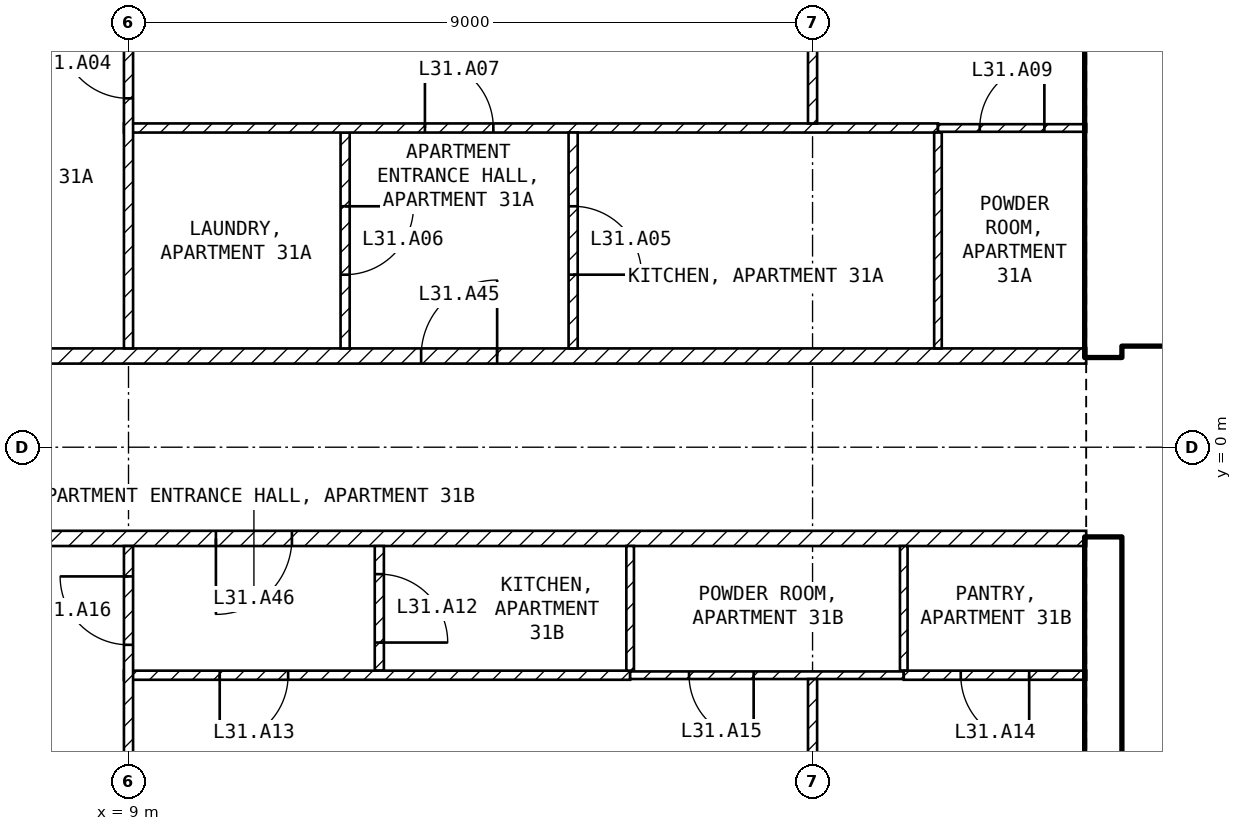
"""IFC4 building model, lengths in metres.
Left out: names, types, materials, properties, quantities, classifications, styles, units other than length and angle.
Written with IfcOpenShell. Run it as: python <this file> out.ifc"""

import sys

from ifc_helpers import new_model, si_unit, direction, frame, frame_2d, origin, place, context, subcontext, project, spatial, rectangle, extrude, element, fill, save


model = new_model("IFC4")
c1 = context("Model", 3, precision=1e-05, world=origin(), true_north=direction((0.0, 1.0)))
c2 = subcontext(c1, "Body", "Model", "MODEL_VIEW")
j1 = project(units=[si_unit("LENGTHUNIT", "METRE"), si_unit("PLANEANGLEUNIT", "RADIAN")], contexts=[c1])
p1 = place(None, origin())
s1 = spatial("IfcSite", under=j1, at=p1, CompositionType="ELEMENT")
p2 = place(p1, origin())
s2 = spatial("IfcBuilding", under=s1, at=p2, CompositionType="ELEMENT")
p3 = place(p2, frame((0.0, 0.0, 130.4)))
s3 = spatial("IfcBuildingStorey", under=s2, at=p3, CompositionType="ELEMENT", Elevation=130.4)
for number, where, z_axis, x_axis in (
    (1, (21.825, -8.1, 0.0), (0.0, 0.0, 1.0), (0.0, 1.0, 0.0)),
    (2, (21.825, 1.2, 0.0), (0.0, 0.0, 1.0), (0.0, 1.0, 0.0)),
):
    element("IfcWall", number, at=place(p3, frame(where, z_axis=z_axis, x_axis=x_axis)), inside=s3, PredefinedType="SHEAR", context=c2, shape_type="SweptSolid", body=[
        extrude(rectangle(XDim=6.9, YDim=0.45, at=frame_2d((3.45, 0.0))), origin(), (0.0, 0.0, 1.0), 3.25),
    ])
p4 = place(p3, frame((22.05, 1.45, 0.0), z_axis=(0.0, 0.0, 1.0), x_axis=(1.0, 0.0, 0.0)))
e3 = element("IfcWall", 3, at=p4, inside=s3, PredefinedType="SOLIDWALL", context=c2, shape_type="SweptSolid", body=[
    extrude(rectangle(XDim=11.0, YDim=0.2, at=frame_2d((5.5, 0.0))), origin(), (0.0, 0.0, 1.0), 3.25),
])
p5 = place(p4, frame((0.75, 0.0, 0.0)))
e4 = element("IfcOpeningElement", 4, at=p5, cuts=e3, PredefinedType="OPENING", context=c2, shape_type="SweptSolid", body=[
    extrude(rectangle(XDim=1.0, YDim=2.1, at=frame_2d((0.5, 1.05))), frame((0.0, 0.11, 0.0), z_axis=(0.0, -1.0, 0.0), x_axis=(1.0, 0.0, 0.0)), (0.0, 0.0, 1.0), 0.22),
])
p6 = place(p4, frame((3.25, 0.0, 0.0)))
e5 = element("IfcOpeningElement", 5, at=p6, cuts=e3, PredefinedType="OPENING", context=c2, shape_type="SweptSolid", body=[
    extrude(rectangle(XDim=1.0, YDim=2.1, at=frame_2d((0.5, 1.05))), frame((0.0, 0.11, 0.0), z_axis=(0.0, -1.0, 0.0), x_axis=(1.0, 0.0, 0.0)), (0.0, 0.0, 1.0), 0.22),
])
p7 = place(p4, frame((9.075, 0.0, 0.0)))
e6 = element("IfcOpeningElement", 6, at=p7, cuts=e3, PredefinedType="OPENING", context=c2, shape_type="SweptSolid", body=[
    extrude(rectangle(XDim=0.9, YDim=2.1, at=frame_2d((0.45, 1.05))), frame((0.0, 0.11, 0.0), z_axis=(0.0, -1.0, 0.0), x_axis=(1.0, 0.0, 0.0)), (0.0, 0.0, 1.0), 0.22),
])
p8 = place(p3, frame((22.05, 5.15, 0.0), z_axis=(0.0, 0.0, 1.0), x_axis=(1.0, 0.0, 0.0)))
e7 = element("IfcWall", 7, at=p8, inside=s3, PredefinedType="SOLIDWALL", context=c2, shape_type="SweptSolid", body=[
    extrude(rectangle(XDim=6.3, YDim=0.2, at=frame_2d((3.15, 0.0))), origin(), (0.0, 0.0, 1.0), 3.25),
])
p9 = place(p8, frame((0.2, 0.0, 0.0)))
e8 = element("IfcOpeningElement", 8, at=p9, cuts=e7, PredefinedType="OPENING", context=c2, shape_type="SweptSolid", body=[
    extrude(rectangle(XDim=1.0, YDim=2.1, at=frame_2d((0.5, 1.05))), frame((0.0, 0.11, 0.0), z_axis=(0.0, -1.0, 0.0), x_axis=(1.0, 0.0, 0.0)), (0.0, 0.0, 1.0), 0.22),
])
p10 = place(p3, frame((4.4, 1.2, 0.0), z_axis=(0.0, 0.0, 1.0), x_axis=(1.0, 0.0, 0.0)))
e9 = element("IfcWall", 9, at=p10, inside=s3, PredefinedType="PARTITIONING", context=c2, shape_type="SweptSolid", body=[
    extrude(rectangle(XDim=17.2, YDim=0.2, at=frame_2d((8.6, 0.0))), origin(), (0.0, 0.0, 1.0), 3.25),
])
p11 = place(p10, frame((8.45, 0.0, 0.0)))
e10 = element("IfcOpeningElement", 10, at=p11, cuts=e9, PredefinedType="OPENING", context=c2, shape_type="SweptSolid", body=[
    extrude(rectangle(XDim=1.0, YDim=2.1, at=frame_2d((0.5, 1.05))), frame((0.0, 0.11, 0.0), z_axis=(0.0, -1.0, 0.0), x_axis=(1.0, 0.0, 0.0)), (0.0, 0.0, 1.0), 0.22),
])
p12 = place(p3, frame((21.6, -1.2, 0.0), z_axis=(0.0, 0.0, 1.0), x_axis=(-1.0, 0.0, 0.0)))
e11 = element("IfcWall", 11, at=p12, inside=s3, PredefinedType="PARTITIONING", context=c2, shape_type="SweptSolid", body=[
    extrude(rectangle(XDim=17.2, YDim=0.2, at=frame_2d((8.6, 0.0))), origin(), (0.0, 0.0, 1.0), 3.25),
])
p13 = place(p12, frame((10.45, 0.0, 0.0)))
e12 = element("IfcOpeningElement", 12, at=p13, cuts=e11, PredefinedType="OPENING", context=c2, shape_type="SweptSolid", body=[
    extrude(rectangle(XDim=1.0, YDim=2.1, at=frame_2d((0.5, 1.05))), frame((0.0, 0.11, 0.0), z_axis=(0.0, -1.0, 0.0), x_axis=(1.0, 0.0, 0.0)), (0.0, 0.0, 1.0), 0.22),
])
p14 = place(p3, frame((11.85, 4.14, 0.0), z_axis=(0.0, 0.0, 1.0), x_axis=(0.0, -1.0, 0.0)))
e13 = element("IfcWall", 13, at=p14, inside=s3, PredefinedType="PARTITIONING", context=c2, shape_type="SweptSolid", body=[
    extrude(rectangle(XDim=2.84, YDim=0.12, at=frame_2d((1.42, 0.0))), origin(), (0.0, 0.0, 1.0), 3.25),
])
p15 = place(p14, frame((0.97, 0.0, 0.0)))
e14 = element("IfcOpeningElement", 14, at=p15, cuts=e13, PredefinedType="OPENING", context=c2, shape_type="SweptSolid", body=[
    extrude(rectangle(XDim=0.9, YDim=2.1, at=frame_2d((0.45, 1.05))), frame((0.0, 0.07, 0.0), z_axis=(0.0, -1.0, 0.0), x_axis=(1.0, 0.0, 0.0)), (0.0, 0.0, 1.0), 0.14),
])
p16 = place(p3, frame((8.94, 4.2, 0.0), z_axis=(0.0, 0.0, 1.0), x_axis=(1.0, 0.0, 0.0)))
e15 = element("IfcWall", 15, at=p16, inside=s3, PredefinedType="PARTITIONING", context=c2, shape_type="SweptSolid", body=[
    extrude(rectangle(XDim=10.71, YDim=0.12, at=frame_2d((5.355, 0.0))), origin(), (0.0, 0.0, 1.0), 3.25),
])
p17 = place(p16, frame((3.96, 0.0, 0.0)))
e16 = element("IfcOpeningElement", 16, at=p17, cuts=e15, PredefinedType="OPENING", context=c2, shape_type="SweptSolid", body=[
    extrude(rectangle(XDim=0.9, YDim=2.1, at=frame_2d((0.45, 1.05))), frame((0.0, 0.07, 0.0), z_axis=(0.0, -1.0, 0.0), x_axis=(1.0, 0.0, 0.0)), (0.0, 0.0, 1.0), 0.14),
])
p18 = place(p3, frame((9.0, 1.3, 0.0), z_axis=(0.0, 0.0, 1.0), x_axis=(0.0, 1.0, 0.0)))
e17 = element("IfcWall", 17, at=p18, inside=s3, PredefinedType="PARTITIONING", context=c2, shape_type="SweptSolid", body=[
    extrude(rectangle(XDim=7.62, YDim=0.12, at=frame_2d((3.81, 0.0))), origin(), (0.0, 0.0, 1.0), 3.25),
])
p19 = place(p18, frame((3.29, 0.0, 0.0)))
e18 = element("IfcOpeningElement", 18, at=p19, cuts=e17, PredefinedType="OPENING", context=c2, shape_type="SweptSolid", body=[
    extrude(rectangle(XDim=0.9, YDim=2.1, at=frame_2d((0.45, 1.05))), frame((0.0, 0.07, 0.0), z_axis=(0.0, -1.0, 0.0), x_axis=(1.0, 0.0, 0.0)), (0.0, 0.0, 1.0), 0.14),
])
p20 = place(p18, frame((4.65, 0.0, 0.0)))
e19 = element("IfcOpeningElement", 19, at=p20, cuts=e17, PredefinedType="OPENING", context=c2, shape_type="SweptSolid", body=[
    extrude(rectangle(XDim=0.9, YDim=2.1, at=frame_2d((0.45, 1.05))), frame((0.0, 0.07, 0.0), z_axis=(0.0, -1.0, 0.0), x_axis=(1.0, 0.0, 0.0)), (0.0, 0.0, 1.0), 0.14),
])
p21 = place(p3, frame((14.85, 4.14, 0.0), z_axis=(0.0, 0.0, 1.0), x_axis=(0.0, -1.0, 0.0)))
e20 = element("IfcWall", 20, at=p21, inside=s3, PredefinedType="PARTITIONING", context=c2, shape_type="SweptSolid", body=[
    extrude(rectangle(XDim=2.84, YDim=0.12, at=frame_2d((1.42, 0.0))), origin(), (0.0, 0.0, 1.0), 3.25),
])
p22 = place(p21, frame((0.97, 0.0, 0.0)))
e21 = element("IfcOpeningElement", 21, at=p22, cuts=e20, PredefinedType="OPENING", context=c2, shape_type="SweptSolid", body=[
    extrude(rectangle(XDim=0.9, YDim=2.1, at=frame_2d((0.45, 1.05))), frame((0.0, 0.07, 0.0), z_axis=(0.0, -1.0, 0.0), x_axis=(1.0, 0.0, 0.0)), (0.0, 0.0, 1.0), 0.14),
])
p23 = place(p3, frame((19.65, 4.14, 0.0), z_axis=(0.0, 0.0, 1.0), x_axis=(0.0, -1.0, 0.0)))
e22 = element("IfcWall", 22, at=p23, inside=s3, PredefinedType="PARTITIONING", context=c2, shape_type="SweptSolid", body=[
    extrude(rectangle(XDim=2.84, YDim=0.1, at=frame_2d((1.42, 0.0))), origin(), (0.0, 0.0, 1.0), 3.25),
])
p24 = place(p3, frame((19.65, 4.2, 0.0), z_axis=(0.0, 0.0, 1.0), x_axis=(1.0, 0.0, 0.0)))
e23 = element("IfcWall", 23, at=p24, inside=s3, PredefinedType="PARTITIONING", context=c2, shape_type="SweptSolid", body=[
    extrude(rectangle(XDim=1.95, YDim=0.1, at=frame_2d((0.975, 0.0))), origin(), (0.0, 0.0, 1.0), 3.25),
])
p25 = place(p24, frame((0.55, 0.0, 0.0)))
e24 = element("IfcOpeningElement", 24, at=p25, cuts=e23, PredefinedType="OPENING", context=c2, shape_type="SweptSolid", body=[
    extrude(rectangle(XDim=0.85, YDim=2.1, at=frame_2d((0.425, 1.05))), frame((0.0, 0.06, 0.0), z_axis=(0.0, -1.0, 0.0), x_axis=(1.0, 0.0, 0.0)), (0.0, 0.0, 1.0), 0.12),
])
p26 = place(p3, frame((18.0, 8.92, 0.0), z_axis=(0.0, 0.0, 1.0), x_axis=(0.0, -1.0, 0.0)))
e25 = element("IfcWall", 25, at=p26, inside=s3, PredefinedType="PARTITIONING", context=c2, shape_type="SweptSolid", body=[
    extrude(rectangle(XDim=4.66, YDim=0.12, at=frame_2d((2.33, 0.0))), origin(), (0.0, 0.0, 1.0), 2.414),
])
p27 = place(p26, frame((2.59, 0.0, 0.0)))
e26 = element("IfcOpeningElement", 26, at=p27, cuts=e25, PredefinedType="OPENING", context=c2, shape_type="SweptSolid", body=[
    extrude(rectangle(XDim=0.9, YDim=2.1, at=frame_2d((0.45, 1.05))), frame((0.0, 0.07, 0.0), z_axis=(0.0, -1.0, 0.0), x_axis=(1.0, 0.0, 0.0)), (0.0, 0.0, 1.0), 0.14),
])
p28 = place(p3, frame((12.3, -1.3, 0.0), z_axis=(0.0, 0.0, 1.0), x_axis=(0.0, -1.0, 0.0)))
e27 = element("IfcWall", 27, at=p28, inside=s3, PredefinedType="PARTITIONING", context=c2, shape_type="SweptSolid", body=[
    extrude(rectangle(XDim=1.64, YDim=0.12, at=frame_2d((0.82, 0.0))), origin(), (0.0, 0.0, 1.0), 3.25),
])
p29 = place(p28, frame((0.37, 0.0, 0.0)))
e28 = element("IfcOpeningElement", 28, at=p29, cuts=e27, PredefinedType="OPENING", context=c2, shape_type="SweptSolid", body=[
    extrude(rectangle(XDim=0.9, YDim=2.1, at=frame_2d((0.45, 1.05))), frame((0.0, 0.07, 0.0), z_axis=(0.0, -1.0, 0.0), x_axis=(1.0, 0.0, 0.0)), (0.0, 0.0, 1.0), 0.14),
])
p30 = place(p3, frame((15.6, -3.0, 0.0), z_axis=(0.0, 0.0, 1.0), x_axis=(-1.0, 0.0, 0.0)))
e29 = element("IfcWall", 29, at=p30, inside=s3, PredefinedType="PARTITIONING", context=c2, shape_type="SweptSolid", body=[
    extrude(rectangle(XDim=6.66, YDim=0.12, at=frame_2d((3.33, 0.0))), origin(), (0.0, 0.0, 1.0), 3.25),
])
p31 = place(p30, frame((4.5, 0.0, 0.0)))
e30 = element("IfcOpeningElement", 30, at=p31, cuts=e29, PredefinedType="OPENING", context=c2, shape_type="SweptSolid", body=[
    extrude(rectangle(XDim=0.9, YDim=2.1, at=frame_2d((0.45, 1.05))), frame((0.0, 0.07, 0.0), z_axis=(0.0, -1.0, 0.0), x_axis=(1.0, 0.0, 0.0)), (0.0, 0.0, 1.0), 0.14),
])
p32 = place(p3, frame((9.0, -8.92, 0.0), z_axis=(0.0, 0.0, 1.0), x_axis=(0.0, 1.0, 0.0)))
e31 = element("IfcWall", 31, at=p32, inside=s3, PredefinedType="PARTITIONING", context=c2, shape_type="SweptSolid", body=[
    extrude(rectangle(XDim=7.62, YDim=0.12, at=frame_2d((3.81, 0.0))), origin(), (0.0, 0.0, 1.0), 3.25),
])
p33 = place(p32, frame((6.32, 0.0, 0.0)))
e32 = element("IfcOpeningElement", 32, at=p33, cuts=e31, PredefinedType="OPENING", context=c2, shape_type="SweptSolid", body=[
    extrude(rectangle(XDim=0.9, YDim=2.1, at=frame_2d((0.45, 1.05))), frame((0.0, 0.07, 0.0), z_axis=(0.0, -1.0, 0.0), x_axis=(1.0, 0.0, 0.0)), (0.0, 0.0, 1.0), 0.14),
])
for number, where, z_axis, x_axis in (
    (33, (15.6, -1.3, 0.0), (0.0, 0.0, 1.0), (0.0, -1.0, 0.0)),
    (34, (19.2, -1.3, 0.0), (0.0, 0.0, 1.0), (0.0, -1.0, 0.0)),
):
    element("IfcWall", number, at=place(p3, frame(where, z_axis=z_axis, x_axis=x_axis)), inside=s3, PredefinedType="PARTITIONING", context=c2, shape_type="SweptSolid", body=[
        extrude(rectangle(XDim=1.64, YDim=0.1, at=frame_2d((0.82, 0.0))), origin(), (0.0, 0.0, 1.0), 3.25),
    ])
p34 = place(p3, frame((19.2, -3.0, 0.0), z_axis=(0.0, 0.0, 1.0), x_axis=(-1.0, 0.0, 0.0)))
e35 = element("IfcWall", 35, at=p34, inside=s3, PredefinedType="PARTITIONING", context=c2, shape_type="SweptSolid", body=[
    extrude(rectangle(XDim=3.6, YDim=0.1, at=frame_2d((1.8, 0.0))), origin(), (0.0, 0.0, 1.0), 3.25),
])
p35 = place(p34, frame((1.975, 0.0, 0.0)))
e36 = element("IfcOpeningElement", 36, at=p35, cuts=e35, PredefinedType="OPENING", context=c2, shape_type="SweptSolid", body=[
    extrude(rectangle(XDim=0.85, YDim=2.1, at=frame_2d((0.425, 1.05))), frame((0.0, 0.06, 0.0), z_axis=(0.0, -1.0, 0.0), x_axis=(1.0, 0.0, 0.0)), (0.0, 0.0, 1.0), 0.12),
])
p36 = place(p3, frame((21.6, -3.0, 0.0), z_axis=(0.0, 0.0, 1.0), x_axis=(-1.0, 0.0, 0.0)))
e37 = element("IfcWall", 37, at=p36, inside=s3, PredefinedType="PARTITIONING", context=c2, shape_type="SweptSolid", body=[
    extrude(rectangle(XDim=2.4, YDim=0.12, at=frame_2d((1.2, 0.0))), origin(), (0.0, 0.0, 1.0), 3.25),
])
p37 = place(p36, frame((0.75, 0.0, 0.0)))
e38 = element("IfcOpeningElement", 38, at=p37, cuts=e37, PredefinedType="OPENING", context=c2, shape_type="SweptSolid", body=[
    extrude(rectangle(XDim=0.9, YDim=2.1, at=frame_2d((0.45, 1.05))), frame((0.0, 0.07, 0.0), z_axis=(0.0, -1.0, 0.0), x_axis=(1.0, 0.0, 0.0)), (0.0, 0.0, 1.0), 0.14),
])
p38 = place(p3, frame((18.0, -3.05, 0.0), z_axis=(0.0, 0.0, 1.0), x_axis=(0.0, -1.0, 0.0)))
e39 = element("IfcWall", 39, at=p38, inside=s3, PredefinedType="PARTITIONING", context=c2, shape_type="SweptSolid", body=[
    extrude(rectangle(XDim=5.87, YDim=0.12, at=frame_2d((2.935, 0.0))), origin(), (0.0, 0.0, 1.0), 2.414),
])
p39 = place(p38, frame((2.375, 0.0, 0.0)))
e40 = element("IfcOpeningElement", 40, at=p39, cuts=e39, PredefinedType="OPENING", context=c2, shape_type="SweptSolid", body=[
    extrude(rectangle(XDim=0.9, YDim=2.1, at=frame_2d((0.45, 1.05))), frame((0.0, 0.07, 0.0), z_axis=(0.0, -1.0, 0.0), x_axis=(1.0, 0.0, 0.0)), (0.0, 0.0, 1.0), 0.14),
])
p40 = place(p9, origin())
e41 = element("IfcDoor", 41, at=p40, inside=s3, OperationType="SINGLE_SWING_LEFT", PredefinedType="DOOR", context=c2, shape_type="SweptSolid", body=[
    extrude(rectangle(XDim=1.0, YDim=2.1, at=frame_2d((0.5, 1.05))), frame((0.0, 0.025, 0.0), z_axis=(0.0, -1.0, 0.0), x_axis=(1.0, 0.0, 0.0)), (0.0, 0.0, 1.0), 0.05),
])
fill(e8, e41)
p41 = place(p19, origin())
e42 = element("IfcDoor", 42, at=p41, inside=s3, OperationType="SINGLE_SWING_RIGHT", PredefinedType="DOOR", context=c2, shape_type="SweptSolid", body=[
    extrude(rectangle(XDim=0.9, YDim=2.1, at=frame_2d((0.45, 1.05))), frame((0.0, 0.025, 0.0), z_axis=(0.0, -1.0, 0.0), x_axis=(1.0, 0.0, 0.0)), (0.0, 0.0, 1.0), 0.05),
])
fill(e18, e42)
p42 = place(p22, origin())
e43 = element("IfcDoor", 43, at=p42, inside=s3, OperationType="SINGLE_SWING_RIGHT", PredefinedType="DOOR", context=c2, shape_type="SweptSolid", body=[
    extrude(rectangle(XDim=0.9, YDim=2.1, at=frame_2d((0.45, 1.05))), frame((0.0, 0.025, 0.0), z_axis=(0.0, -1.0, 0.0), x_axis=(1.0, 0.0, 0.0)), (0.0, 0.0, 1.0), 0.05),
])
fill(e21, e43)
p43 = place(p15, origin())
e44 = element("IfcDoor", 44, at=p43, inside=s3, OperationType="SINGLE_SWING_LEFT", PredefinedType="DOOR", context=c2, shape_type="SweptSolid", body=[
    extrude(rectangle(XDim=0.9, YDim=2.1, at=frame_2d((0.45, 1.05))), frame((0.0, 0.025, 0.0), z_axis=(0.0, -1.0, 0.0), x_axis=(1.0, 0.0, 0.0)), (0.0, 0.0, 1.0), 0.05),
])
fill(e14, e44)
p44 = place(p17, origin())
e45 = element("IfcDoor", 45, at=p44, inside=s3, OperationType="SINGLE_SWING_LEFT", PredefinedType="DOOR", context=c2, shape_type="SweptSolid", body=[
    extrude(rectangle(XDim=0.9, YDim=2.1, at=frame_2d((0.45, 1.05))), frame((0.0, 0.025, 0.0), z_axis=(0.0, -1.0, 0.0), x_axis=(1.0, 0.0, 0.0)), (0.0, 0.0, 1.0), 0.05),
])
fill(e16, e45)
p45 = place(p25, origin())
e46 = element("IfcDoor", 46, at=p45, inside=s3, OperationType="SINGLE_SWING_RIGHT", PredefinedType="DOOR", context=c2, shape_type="SweptSolid", body=[
    extrude(rectangle(XDim=0.85, YDim=2.1, at=frame_2d((0.425, 1.05))), frame((0.0, 0.025, 0.0), z_axis=(0.0, -1.0, 0.0), x_axis=(1.0, 0.0, 0.0)), (0.0, 0.0, 1.0), 0.05),
])
fill(e24, e46)
p46 = place(p29, origin())
e47 = element("IfcDoor", 47, at=p46, inside=s3, OperationType="SINGLE_SWING_RIGHT", PredefinedType="DOOR", context=c2, shape_type="SweptSolid", body=[
    extrude(rectangle(XDim=0.9, YDim=2.1, at=frame_2d((0.45, 1.05))), frame((0.0, 0.025, 0.0), z_axis=(0.0, -1.0, 0.0), x_axis=(1.0, 0.0, 0.0)), (0.0, 0.0, 1.0), 0.05),
])
fill(e28, e47)
p47 = place(p31, origin())
e48 = element("IfcDoor", 48, at=p47, inside=s3, OperationType="SINGLE_SWING_RIGHT", PredefinedType="DOOR", context=c2, shape_type="SweptSolid", body=[
    extrude(rectangle(XDim=0.9, YDim=2.1, at=frame_2d((0.45, 1.05))), frame((0.0, 0.025, 0.0), z_axis=(0.0, -1.0, 0.0), x_axis=(1.0, 0.0, 0.0)), (0.0, 0.0, 1.0), 0.05),
])
fill(e30, e48)
p48 = place(p37, origin())
e49 = element("IfcDoor", 49, at=p48, inside=s3, OperationType="SINGLE_SWING_LEFT", PredefinedType="DOOR", context=c2, shape_type="SweptSolid", body=[
    extrude(rectangle(XDim=0.9, YDim=2.1, at=frame_2d((0.45, 1.05))), frame((0.0, 0.025, 0.0), z_axis=(0.0, -1.0, 0.0), x_axis=(1.0, 0.0, 0.0)), (0.0, 0.0, 1.0), 0.05),
])
fill(e38, e49)
p49 = place(p35, origin())
e50 = element("IfcDoor", 50, at=p49, inside=s3, OperationType="SINGLE_SWING_LEFT", PredefinedType="DOOR", context=c2, shape_type="SweptSolid", body=[
    extrude(rectangle(XDim=0.85, YDim=2.1, at=frame_2d((0.425, 1.05))), frame((0.0, 0.025, 0.0), z_axis=(0.0, -1.0, 0.0), x_axis=(1.0, 0.0, 0.0)), (0.0, 0.0, 1.0), 0.05),
])
fill(e36, e50)
p50 = place(p33, origin())
e51 = element("IfcDoor", 51, at=p50, inside=s3, OperationType="SINGLE_SWING_RIGHT", PredefinedType="DOOR", context=c2, shape_type="SweptSolid", body=[
    extrude(rectangle(XDim=0.9, YDim=2.1, at=frame_2d((0.45, 1.05))), frame((0.0, 0.025, 0.0), z_axis=(0.0, -1.0, 0.0), x_axis=(1.0, 0.0, 0.0)), (0.0, 0.0, 1.0), 0.05),
])
fill(e32, e51)
p51 = place(p11, origin())
e52 = element("IfcDoor", 52, at=p51, inside=s3, OperationType="SINGLE_SWING_RIGHT", PredefinedType="DOOR", context=c2, shape_type="SweptSolid", body=[
    extrude(rectangle(XDim=1.0, YDim=2.1, at=frame_2d((0.5, 1.05))), frame((0.0, 0.025, 0.0), z_axis=(0.0, -1.0, 0.0), x_axis=(1.0, 0.0, 0.0)), (0.0, 0.0, 1.0), 0.05),
])
fill(e10, e52)
p52 = place(p13, origin())
e53 = element("IfcDoor", 53, at=p52, inside=s3, OperationType="SINGLE_SWING_RIGHT", PredefinedType="DOOR", context=c2, shape_type="SweptSolid", body=[
    extrude(rectangle(XDim=1.0, YDim=2.1, at=frame_2d((0.5, 1.05))), frame((0.0, 0.025, 0.0), z_axis=(0.0, -1.0, 0.0), x_axis=(1.0, 0.0, 0.0)), (0.0, 0.0, 1.0), 0.05),
])
fill(e12, e53)
save(model, sys.argv[1])
